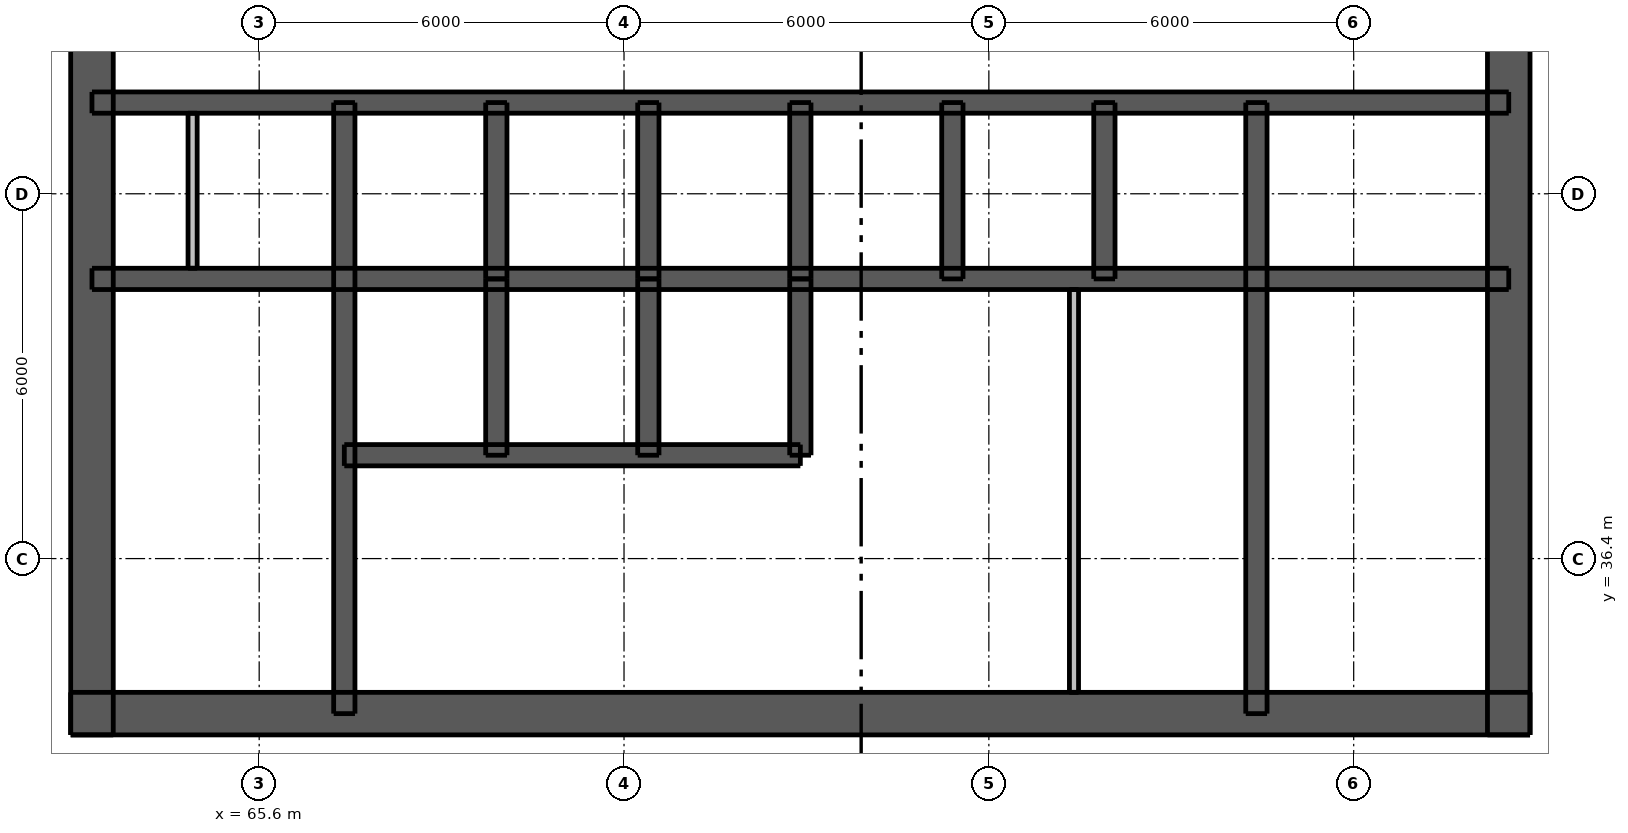
"""IFC4 building model, lengths in metres.
Left out: names, types, materials, properties, quantities, classifications, styles, units other than length and angle.
Written with IfcOpenShell. Run it as: python <this file> out.ifc"""

import sys

from ifc_helpers import new_model, si_unit, direction, frame, frame_2d, origin, place, context, subcontext, project, spatial, rectangle, extrude, element, fill, save


model = new_model("IFC4")
c1 = context("Model", 3, precision=1e-05, world=origin(), true_north=direction((0.0, 1.0)))
c2 = subcontext(c1, "Body", "Model", "MODEL_VIEW")
j1 = project(units=[si_unit("LENGTHUNIT", "METRE"), si_unit("PLANEANGLEUNIT", "RADIAN")], contexts=[c1])
p1 = place(None, origin())
s1 = spatial("IfcSite", under=j1, at=p1, CompositionType="ELEMENT")
p2 = place(p1, origin())
s2 = spatial("IfcBuilding", under=s1, at=p2, CompositionType="ELEMENT")
p3 = place(p2, frame((0.0, 0.0, 150.4)))
s3 = spatial("IfcBuildingStorey", under=s2, at=p3, CompositionType="ELEMENT", Elevation=150.4)
p4 = place(p3, frame((62.5, 33.85, 0.0), z_axis=(0.0, 0.0, 1.0), x_axis=(1.0, 0.0, 0.0)))
e1 = element("IfcWall", 1, at=p4, inside=s3, PredefinedType="SHEAR", context=c2, shape_type="SweptSolid", body=[
    extrude(rectangle(XDim=24.0, YDim=0.7, at=frame_2d((12.0, 0.0))), origin(), (0.0, 0.0, 1.0), 4.25),
])
p5 = place(p4, frame((1.962, 0.0, 0.0)))
e2 = element("IfcOpeningElement", 2, at=p5, cuts=e1, PredefinedType="OPENING", context=c2, shape_type="SweptSolid", body=[
    extrude(rectangle(XDim=1.1, YDim=2.1, at=frame_2d((0.55, 1.05))), frame((0.0, 0.36, 0.0), z_axis=(0.0, -1.0, 0.0), x_axis=(1.0, 0.0, 0.0)), (0.0, 0.0, 1.0), 0.72),
])
p6 = place(p4, frame((20.938, 0.0, 0.0)))
e3 = element("IfcOpeningElement", 3, at=p6, cuts=e1, PredefinedType="OPENING", context=c2, shape_type="SweptSolid", body=[
    extrude(rectangle(XDim=1.1, YDim=2.1, at=frame_2d((0.55, 1.05))), frame((0.0, 0.36, 0.0), z_axis=(0.0, -1.0, 0.0), x_axis=(1.0, 0.0, 0.0)), (0.0, 0.0, 1.0), 0.72),
])
p7 = place(p4, frame((8.0, 0.0, 0.0)))
e4 = element("IfcOpeningElement", 4, at=p7, cuts=e1, PredefinedType="OPENING", context=c2, shape_type="SweptSolid", body=[
    extrude(rectangle(XDim=1.1, YDim=2.1, at=frame_2d((0.55, 1.05))), frame((0.0, 0.36, 0.0), z_axis=(0.0, -1.0, 0.0), x_axis=(1.0, 0.0, 0.0)), (0.0, 0.0, 1.0), 0.72),
])
p8 = place(p4, frame((17.5, 0.0, 0.0)))
e5 = element("IfcOpeningElement", 5, at=p8, cuts=e1, PredefinedType="OPENING", context=c2, shape_type="SweptSolid", body=[
    extrude(rectangle(XDim=0.9, YDim=2.1, at=frame_2d((0.45, 1.05))), frame((0.0, 0.36, 0.0), z_axis=(0.0, -1.0, 0.0), x_axis=(1.0, 0.0, 0.0)), (0.0, 0.0, 1.0), 0.72),
])
p9 = place(p3, frame((62.85, 33.5, 0.0), z_axis=(0.0, 0.0, 1.0), x_axis=(0.0, 1.0, 0.0)))
e6 = element("IfcWall", 6, at=p9, inside=s3, PredefinedType="SHEAR", context=c2, shape_type="SweptSolid", body=[
    extrude(rectangle(XDim=24.0, YDim=0.7, at=frame_2d((12.0, 0.0))), origin(), (0.0, 0.0, 1.0), 4.25),
])
p10 = place(p9, frame((11.2, 0.0, 0.0)))
e7 = element("IfcOpeningElement", 7, at=p10, cuts=e6, PredefinedType="OPENING", context=c2, shape_type="SweptSolid", body=[
    extrude(rectangle(XDim=1.6, YDim=2.1, at=frame_2d((0.8, 1.05))), frame((0.0, 0.36, 0.0), z_axis=(0.0, -1.0, 0.0), x_axis=(1.0, 0.0, 0.0)), (0.0, 0.0, 1.0), 0.72),
])
p11 = place(p3, frame((86.15, 33.5, 0.0), z_axis=(0.0, 0.0, 1.0), x_axis=(0.0, 1.0, 0.0)))
e8 = element("IfcWall", 8, at=p11, inside=s3, PredefinedType="SHEAR", context=c2, shape_type="SweptSolid", body=[
    extrude(rectangle(XDim=24.0, YDim=0.7, at=frame_2d((12.0, 0.0))), origin(), (0.0, 0.0, 1.0), 4.25),
])
p12 = place(p11, frame((11.2, 0.0, 0.0)))
e9 = element("IfcOpeningElement", 9, at=p12, cuts=e8, PredefinedType="OPENING", context=c2, shape_type="SweptSolid", body=[
    extrude(rectangle(XDim=1.6, YDim=2.1, at=frame_2d((0.8, 1.05))), frame((0.0, 0.36, 0.0), z_axis=(0.0, -1.0, 0.0), x_axis=(1.0, 0.0, 0.0)), (0.0, 0.0, 1.0), 0.72),
])
p13 = place(p3, frame((62.85, 41.0, 0.0), z_axis=(0.0, 0.0, 1.0), x_axis=(1.0, 0.0, 0.0)))
e10 = element("IfcWall", 10, at=p13, inside=s3, PredefinedType="SHEAR", context=c2, shape_type="SweptSolid", body=[
    extrude(rectangle(XDim=23.3, YDim=0.35, at=frame_2d((11.65, 0.0))), origin(), (0.0, 0.0, 1.0), 4.25),
])
p14 = place(p3, frame((62.85, 43.9, 0.0), z_axis=(0.0, 0.0, 1.0), x_axis=(1.0, 0.0, 0.0)))
e11 = element("IfcWall", 11, at=p14, inside=s3, PredefinedType="SHEAR", context=c2, shape_type="SweptSolid", body=[
    extrude(rectangle(XDim=23.3, YDim=0.35, at=frame_2d((11.65, 0.0))), origin(), (0.0, 0.0, 1.0), 4.25),
])
p15 = place(p14, frame((0.603, 0.0, 0.0)))
e12 = element("IfcOpeningElement", 12, at=p15, cuts=e11, PredefinedType="OPENING", context=c2, shape_type="SweptSolid", body=[
    extrude(rectangle(XDim=0.8, YDim=2.1, at=frame_2d((0.4, 1.05))), frame((0.0, 0.185, 0.0), z_axis=(0.0, -1.0, 0.0), x_axis=(1.0, 0.0, 0.0)), (0.0, 0.0, 1.0), 0.37),
])
p16 = place(p14, frame((2.365, 0.0, 0.0)))
e13 = element("IfcOpeningElement", 13, at=p16, cuts=e11, PredefinedType="OPENING", context=c2, shape_type="SweptSolid", body=[
    extrude(rectangle(XDim=0.9, YDim=2.1, at=frame_2d((0.45, 1.05))), frame((0.0, 0.185, 0.0), z_axis=(0.0, -1.0, 0.0), x_axis=(1.0, 0.0, 0.0)), (0.0, 0.0, 1.0), 0.37),
])
p17 = place(p14, frame((20.688, 0.0, 0.0)))
e14 = element("IfcOpeningElement", 14, at=p17, cuts=e11, PredefinedType="OPENING", context=c2, shape_type="SweptSolid", body=[
    extrude(rectangle(XDim=0.9, YDim=2.1, at=frame_2d((0.45, 1.05))), frame((0.0, 0.185, 0.0), z_axis=(0.0, -1.0, 0.0), x_axis=(1.0, 0.0, 0.0)), (0.0, 0.0, 1.0), 0.37),
])
p18 = place(p14, frame((4.85, 0.0, 0.0)))
e15 = element("IfcOpeningElement", 15, at=p18, cuts=e11, PredefinedType="OPENING", context=c2, shape_type="SweptSolid", body=[
    extrude(rectangle(XDim=1.1, YDim=2.1, at=frame_2d((0.55, 1.05))), frame((0.0, 0.185, 0.0), z_axis=(0.0, -1.0, 0.0), x_axis=(1.0, 0.0, 0.0)), (0.0, 0.0, 1.0), 0.37),
])
p19 = place(p14, frame((7.35, 0.0, 0.0)))
e16 = element("IfcOpeningElement", 16, at=p19, cuts=e11, PredefinedType="OPENING", context=c2, shape_type="SweptSolid", body=[
    extrude(rectangle(XDim=1.1, YDim=2.1, at=frame_2d((0.55, 1.05))), frame((0.0, 0.185, 0.0), z_axis=(0.0, -1.0, 0.0), x_axis=(1.0, 0.0, 0.0)), (0.0, 0.0, 1.0), 0.37),
])
p20 = place(p14, frame((9.85, 0.0, 0.0)))
e17 = element("IfcOpeningElement", 17, at=p20, cuts=e11, PredefinedType="OPENING", context=c2, shape_type="SweptSolid", body=[
    extrude(rectangle(XDim=1.1, YDim=2.1, at=frame_2d((0.55, 1.05))), frame((0.0, 0.185, 0.0), z_axis=(0.0, -1.0, 0.0), x_axis=(1.0, 0.0, 0.0)), (0.0, 0.0, 1.0), 0.37),
])
p21 = place(p14, frame((12.35, 0.0, 0.0)))
e18 = element("IfcOpeningElement", 18, at=p21, cuts=e11, PredefinedType="OPENING", context=c2, shape_type="SweptSolid", body=[
    extrude(rectangle(XDim=1.1, YDim=2.1, at=frame_2d((0.55, 1.05))), frame((0.0, 0.185, 0.0), z_axis=(0.0, -1.0, 0.0), x_axis=(1.0, 0.0, 0.0)), (0.0, 0.0, 1.0), 0.37),
])
p22 = place(p14, frame((14.85, 0.0, 0.0)))
e19 = element("IfcOpeningElement", 19, at=p22, cuts=e11, PredefinedType="OPENING", context=c2, shape_type="SweptSolid", body=[
    extrude(rectangle(XDim=1.1, YDim=2.1, at=frame_2d((0.55, 1.05))), frame((0.0, 0.185, 0.0), z_axis=(0.0, -1.0, 0.0), x_axis=(1.0, 0.0, 0.0)), (0.0, 0.0, 1.0), 0.37),
])
p23 = place(p14, frame((17.35, 0.0, 0.0)))
e20 = element("IfcOpeningElement", 20, at=p23, cuts=e11, PredefinedType="OPENING", context=c2, shape_type="SweptSolid", body=[
    extrude(rectangle(XDim=1.1, YDim=2.1, at=frame_2d((0.55, 1.05))), frame((0.0, 0.185, 0.0), z_axis=(0.0, -1.0, 0.0), x_axis=(1.0, 0.0, 0.0)), (0.0, 0.0, 1.0), 0.37),
])
p24 = place(p3, frame((67.0, 33.85, 0.0), z_axis=(0.0, 0.0, 1.0), x_axis=(0.0, 1.0, 0.0)))
e21 = element("IfcWall", 21, at=p24, inside=s3, PredefinedType="SHEAR", context=c2, shape_type="SweptSolid", body=[
    extrude(rectangle(XDim=10.05, YDim=0.35, at=frame_2d((5.025, 0.0))), origin(), (0.0, 0.0, 1.0), 4.25),
])
p25 = place(p24, frame((0.55, 0.0, 0.0)))
e22 = element("IfcOpeningElement", 22, at=p25, cuts=e21, PredefinedType="OPENING", context=c2, shape_type="SweptSolid", body=[
    extrude(rectangle(XDim=1.1, YDim=2.1, at=frame_2d((0.55, 1.05))), frame((0.0, 0.185, 0.0), z_axis=(0.0, -1.0, 0.0), x_axis=(1.0, 0.0, 0.0)), (0.0, 0.0, 1.0), 0.37),
])
p26 = place(p3, frame((82.0, 33.85, 0.0), z_axis=(0.0, 0.0, 1.0), x_axis=(0.0, 1.0, 0.0)))
e23 = element("IfcWall", 23, at=p26, inside=s3, PredefinedType="SHEAR", context=c2, shape_type="SweptSolid", body=[
    extrude(rectangle(XDim=10.05, YDim=0.35, at=frame_2d((5.025, 0.0))), origin(), (0.0, 0.0, 1.0), 4.25),
])
for number, where, z_axis, x_axis in (
    (24, (69.5, 41.0, 0.0), (0.0, 0.0, 1.0), (0.0, 1.0, 0.0)),
    (25, (72.0, 41.0, 0.0), (0.0, 0.0, 1.0), (0.0, 1.0, 0.0)),
    (26, (74.5, 41.0, 0.0), (0.0, 0.0, 1.0), (0.0, 1.0, 0.0)),
    (27, (77.0, 41.0, 0.0), (0.0, 0.0, 1.0), (0.0, 1.0, 0.0)),
    (28, (79.5, 41.0, 0.0), (0.0, 0.0, 1.0), (0.0, 1.0, 0.0)),
):
    element("IfcWall", number, at=place(p3, frame(where, z_axis=z_axis, x_axis=x_axis)), inside=s3, PredefinedType="SHEAR", context=c2, shape_type="SweptSolid", body=[
        extrude(rectangle(XDim=2.9, YDim=0.35, at=frame_2d((1.45, 0.0))), origin(), (0.0, 0.0, 1.0), 4.25),
    ])
p27 = place(p3, frame((67.0, 38.1, 0.0), z_axis=(0.0, 0.0, 1.0), x_axis=(1.0, 0.0, 0.0)))
e29 = element("IfcWall", 29, at=p27, inside=s3, PredefinedType="SHEAR", context=c2, shape_type="SweptSolid", body=[
    extrude(rectangle(XDim=7.5, YDim=0.35, at=frame_2d((3.75, 0.0))), origin(), (0.0, 0.0, 1.0), 4.25),
])
p28 = place(p27, frame((0.7, 0.0, 0.0)))
e30 = element("IfcOpeningElement", 30, at=p28, cuts=e29, PredefinedType="OPENING", context=c2, shape_type="SweptSolid", body=[
    extrude(rectangle(XDim=1.1, YDim=2.1, at=frame_2d((0.55, 1.05))), frame((0.0, 0.185, 0.0), z_axis=(0.0, -1.0, 0.0), x_axis=(1.0, 0.0, 0.0)), (0.0, 0.0, 1.0), 0.37),
])
p29 = place(p27, frame((3.2, 0.0, 0.0)))
e31 = element("IfcOpeningElement", 31, at=p29, cuts=e29, PredefinedType="OPENING", context=c2, shape_type="SweptSolid", body=[
    extrude(rectangle(XDim=1.1, YDim=2.1, at=frame_2d((0.55, 1.05))), frame((0.0, 0.185, 0.0), z_axis=(0.0, -1.0, 0.0), x_axis=(1.0, 0.0, 0.0)), (0.0, 0.0, 1.0), 0.37),
])
p30 = place(p27, frame((5.65, 0.0, 0.0)))
e32 = element("IfcOpeningElement", 32, at=p30, cuts=e29, PredefinedType="OPENING", context=c2, shape_type="SweptSolid", body=[
    extrude(rectangle(XDim=1.2, YDim=2.1, at=frame_2d((0.6, 1.05))), frame((0.0, 0.185, 0.0), z_axis=(0.0, -1.0, 0.0), x_axis=(1.0, 0.0, 0.0)), (0.0, 0.0, 1.0), 0.37),
])
for number, where, z_axis, x_axis in (
    (33, (69.5, 38.1, 0.0), (0.0, 0.0, 1.0), (0.0, 1.0, 0.0)),
    (34, (72.0, 38.1, 0.0), (0.0, 0.0, 1.0), (0.0, 1.0, 0.0)),
    (35, (74.5, 38.1, 0.0), (0.0, 0.0, 1.0), (0.0, 1.0, 0.0)),
):
    element("IfcWall", number, at=place(p3, frame(where, z_axis=z_axis, x_axis=x_axis)), inside=s3, PredefinedType="SHEAR", context=c2, shape_type="SweptSolid", body=[
        extrude(rectangle(XDim=2.9, YDim=0.35, at=frame_2d((1.45, 0.0))), origin(), (0.0, 0.0, 1.0), 4.25),
    ])
p31 = place(p3, frame((79.0, 34.2, 0.0), z_axis=(0.0, 0.0, 1.0), x_axis=(0.0, 1.0, 0.0)))
e36 = element("IfcWall", 36, at=p31, inside=s3, PredefinedType="PLUMBINGWALL", context=c2, shape_type="SweptSolid", body=[
    extrude(rectangle(XDim=6.625, YDim=0.15, at=frame_2d((3.312, 0.0))), origin(), (0.0, 0.0, 1.0), 4.25),
])
p32 = place(p3, frame((64.505, 41.175, 0.0), z_axis=(0.0, 0.0, 1.0), x_axis=(0.0, 1.0, 0.0)))
e37 = element("IfcWall", 37, at=p32, inside=s3, PredefinedType="PLUMBINGWALL", context=c2, shape_type="SweptSolid", body=[
    extrude(rectangle(XDim=2.55, YDim=0.15, at=frame_2d((1.275, 0.0))), origin(), (0.0, 0.0, 1.0), 4.25),
])
p33 = place(p5, origin())
e38 = element("IfcDoor", 38, at=p33, inside=s3, OperationType="SINGLE_SWING_LEFT", PredefinedType="DOOR", context=c2, shape_type="SweptSolid", body=[
    extrude(rectangle(XDim=1.1, YDim=2.1, at=frame_2d((0.55, 1.05))), frame((0.0, 0.337, 0.0), z_axis=(0.0, -1.0, 0.0), x_axis=(1.0, 0.0, 0.0)), (0.0, 0.0, 1.0), 0.05),
])
fill(e2, e38)
p34 = place(p6, origin())
e39 = element("IfcDoor", 39, at=p34, inside=s3, OperationType="SINGLE_SWING_RIGHT", PredefinedType="DOOR", context=c2, shape_type="SweptSolid", body=[
    extrude(rectangle(XDim=1.1, YDim=2.1, at=frame_2d((0.55, 1.05))), frame((0.0, 0.337, 0.0), z_axis=(0.0, -1.0, 0.0), x_axis=(1.0, 0.0, 0.0)), (0.0, 0.0, 1.0), 0.05),
])
fill(e3, e39)
p35 = place(p10, origin())
e40 = element("IfcDoor", 40, at=p35, inside=s3, OperationType="DOUBLE_DOOR_SINGLE_SWING", PredefinedType="DOOR", context=c2, shape_type="SweptSolid", body=[
    extrude(rectangle(XDim=1.6, YDim=2.1, at=frame_2d((0.8, 1.05))), frame((0.0, -0.288, 0.0), z_axis=(0.0, -1.0, 0.0), x_axis=(1.0, 0.0, 0.0)), (0.0, 0.0, 1.0), 0.05),
])
fill(e7, e40)
p36 = place(p12, origin())
e41 = element("IfcDoor", 41, at=p36, inside=s3, OperationType="DOUBLE_DOOR_SINGLE_SWING", PredefinedType="DOOR", context=c2, shape_type="SweptSolid", body=[
    extrude(rectangle(XDim=1.6, YDim=2.1, at=frame_2d((0.8, 1.05))), frame((0.0, 0.337, 0.0), z_axis=(0.0, -1.0, 0.0), x_axis=(1.0, 0.0, 0.0)), (0.0, 0.0, 1.0), 0.05),
])
fill(e9, e41)
p37 = place(p7, origin())
e42 = element("IfcDoor", 42, at=p37, inside=s3, OperationType="SINGLE_SWING_LEFT", PredefinedType="DOOR", context=c2, shape_type="SweptSolid", body=[
    extrude(rectangle(XDim=1.1, YDim=2.1, at=frame_2d((0.55, 1.05))), frame((0.0, 0.337, 0.0), z_axis=(0.0, -1.0, 0.0), x_axis=(1.0, 0.0, 0.0)), (0.0, 0.0, 1.0), 0.05),
])
fill(e4, e42)
p38 = place(p25, origin())
e43 = element("IfcDoor", 43, at=p38, inside=s3, OperationType="SINGLE_SWING_RIGHT", PredefinedType="DOOR", context=c2, shape_type="SweptSolid", body=[
    extrude(rectangle(XDim=1.1, YDim=2.1, at=frame_2d((0.55, 1.05))), frame((0.0, -0.112, 0.0), z_axis=(0.0, -1.0, 0.0), x_axis=(1.0, 0.0, 0.0)), (0.0, 0.0, 1.0), 0.05),
])
fill(e22, e43)
p39 = place(p8, origin())
e44 = element("IfcDoor", 44, at=p39, inside=s3, OperationType="SINGLE_SWING_LEFT", PredefinedType="DOOR", context=c2, shape_type="SweptSolid", body=[
    extrude(rectangle(XDim=0.9, YDim=2.1, at=frame_2d((0.45, 1.05))), frame((0.0, 0.337, 0.0), z_axis=(0.0, -1.0, 0.0), x_axis=(1.0, 0.0, 0.0)), (0.0, 0.0, 1.0), 0.05),
])
fill(e5, e44)
p40 = place(p15, origin())
e45 = element("IfcDoor", 45, at=p40, inside=s3, OperationType="SINGLE_SWING_LEFT", PredefinedType="DOOR", context=c2, shape_type="SweptSolid", body=[
    extrude(rectangle(XDim=0.8, YDim=2.1, at=frame_2d((0.4, 1.05))), frame((0.0, -0.112, 0.0), z_axis=(0.0, -1.0, 0.0), x_axis=(1.0, 0.0, 0.0)), (0.0, 0.0, 1.0), 0.05),
])
fill(e12, e45)
p41 = place(p16, origin())
e46 = element("IfcDoor", 46, at=p41, inside=s3, OperationType="SINGLE_SWING_RIGHT", PredefinedType="DOOR", context=c2, shape_type="SweptSolid", body=[
    extrude(rectangle(XDim=0.9, YDim=2.1, at=frame_2d((0.45, 1.05))), frame((0.0, -0.112, 0.0), z_axis=(0.0, -1.0, 0.0), x_axis=(1.0, 0.0, 0.0)), (0.0, 0.0, 1.0), 0.05),
])
fill(e13, e46)
p42 = place(p17, origin())
e47 = element("IfcDoor", 47, at=p42, inside=s3, OperationType="SINGLE_SWING_LEFT", PredefinedType="DOOR", context=c2, shape_type="SweptSolid", body=[
    extrude(rectangle(XDim=0.9, YDim=2.1, at=frame_2d((0.45, 1.05))), frame((0.0, -0.112, 0.0), z_axis=(0.0, -1.0, 0.0), x_axis=(1.0, 0.0, 0.0)), (0.0, 0.0, 1.0), 0.05),
])
fill(e14, e47)
p43 = place(p18, origin())
e48 = element("IfcDoor", 48, at=p43, inside=s3, OperationType="DOUBLE_DOOR_SLIDING", PredefinedType="DOOR", context=c2, shape_type="SweptSolid", body=[
    extrude(rectangle(XDim=1.1, YDim=2.1, at=frame_2d((0.55, 1.05))), frame((0.0, 0.025, 0.0), z_axis=(0.0, -1.0, 0.0), x_axis=(1.0, 0.0, 0.0)), (0.0, 0.0, 1.0), 0.05),
])
fill(e15, e48)
p44 = place(p19, origin())
e49 = element("IfcDoor", 49, at=p44, inside=s3, OperationType="DOUBLE_DOOR_SLIDING", PredefinedType="DOOR", context=c2, shape_type="SweptSolid", body=[
    extrude(rectangle(XDim=1.1, YDim=2.1, at=frame_2d((0.55, 1.05))), frame((0.0, 0.025, 0.0), z_axis=(0.0, -1.0, 0.0), x_axis=(1.0, 0.0, 0.0)), (0.0, 0.0, 1.0), 0.05),
])
fill(e16, e49)
p45 = place(p20, origin())
e50 = element("IfcDoor", 50, at=p45, inside=s3, OperationType="DOUBLE_DOOR_SLIDING", PredefinedType="DOOR", context=c2, shape_type="SweptSolid", body=[
    extrude(rectangle(XDim=1.1, YDim=2.1, at=frame_2d((0.55, 1.05))), frame((0.0, 0.025, 0.0), z_axis=(0.0, -1.0, 0.0), x_axis=(1.0, 0.0, 0.0)), (0.0, 0.0, 1.0), 0.05),
])
fill(e17, e50)
p46 = place(p21, origin())
e51 = element("IfcDoor", 51, at=p46, inside=s3, OperationType="DOUBLE_DOOR_SLIDING", PredefinedType="DOOR", context=c2, shape_type="SweptSolid", body=[
    extrude(rectangle(XDim=1.1, YDim=2.1, at=frame_2d((0.55, 1.05))), frame((0.0, 0.025, 0.0), z_axis=(0.0, -1.0, 0.0), x_axis=(1.0, 0.0, 0.0)), (0.0, 0.0, 1.0), 0.05),
])
fill(e18, e51)
p47 = place(p22, origin())
e52 = element("IfcDoor", 52, at=p47, inside=s3, OperationType="DOUBLE_DOOR_SLIDING", PredefinedType="DOOR", context=c2, shape_type="SweptSolid", body=[
    extrude(rectangle(XDim=1.1, YDim=2.1, at=frame_2d((0.55, 1.05))), frame((0.0, 0.025, 0.0), z_axis=(0.0, -1.0, 0.0), x_axis=(1.0, 0.0, 0.0)), (0.0, 0.0, 1.0), 0.05),
])
fill(e19, e52)
p48 = place(p23, origin())
e53 = element("IfcDoor", 53, at=p48, inside=s3, OperationType="DOUBLE_DOOR_SLIDING", PredefinedType="DOOR", context=c2, shape_type="SweptSolid", body=[
    extrude(rectangle(XDim=1.1, YDim=2.1, at=frame_2d((0.55, 1.05))), frame((0.0, 0.025, 0.0), z_axis=(0.0, -1.0, 0.0), x_axis=(1.0, 0.0, 0.0)), (0.0, 0.0, 1.0), 0.05),
])
fill(e20, e53)
p49 = place(p28, origin())
e54 = element("IfcDoor", 54, at=p49, inside=s3, OperationType="DOUBLE_DOOR_SLIDING", PredefinedType="DOOR", context=c2, shape_type="SweptSolid", body=[
    extrude(rectangle(XDim=1.1, YDim=2.1, at=frame_2d((0.55, 1.05))), frame((0.0, 0.025, 0.0), z_axis=(0.0, -1.0, 0.0), x_axis=(1.0, 0.0, 0.0)), (0.0, 0.0, 1.0), 0.05),
])
fill(e30, e54)
p50 = place(p29, origin())
e55 = element("IfcDoor", 55, at=p50, inside=s3, OperationType="DOUBLE_DOOR_SLIDING", PredefinedType="DOOR", context=c2, shape_type="SweptSolid", body=[
    extrude(rectangle(XDim=1.1, YDim=2.1, at=frame_2d((0.55, 1.05))), frame((0.0, 0.025, 0.0), z_axis=(0.0, -1.0, 0.0), x_axis=(1.0, 0.0, 0.0)), (0.0, 0.0, 1.0), 0.05),
])
fill(e31, e55)
p51 = place(p30, origin())
e56 = element("IfcDoor", 56, at=p51, inside=s3, OperationType="DOUBLE_DOOR_SLIDING", PredefinedType="DOOR", context=c2, shape_type="SweptSolid", body=[
    extrude(rectangle(XDim=1.2, YDim=2.1, at=frame_2d((0.6, 1.05))), frame((0.0, 0.025, 0.0), z_axis=(0.0, -1.0, 0.0), x_axis=(1.0, 0.0, 0.0)), (0.0, 0.0, 1.0), 0.05),
])
fill(e32, e56)
save(model, sys.argv[1])
